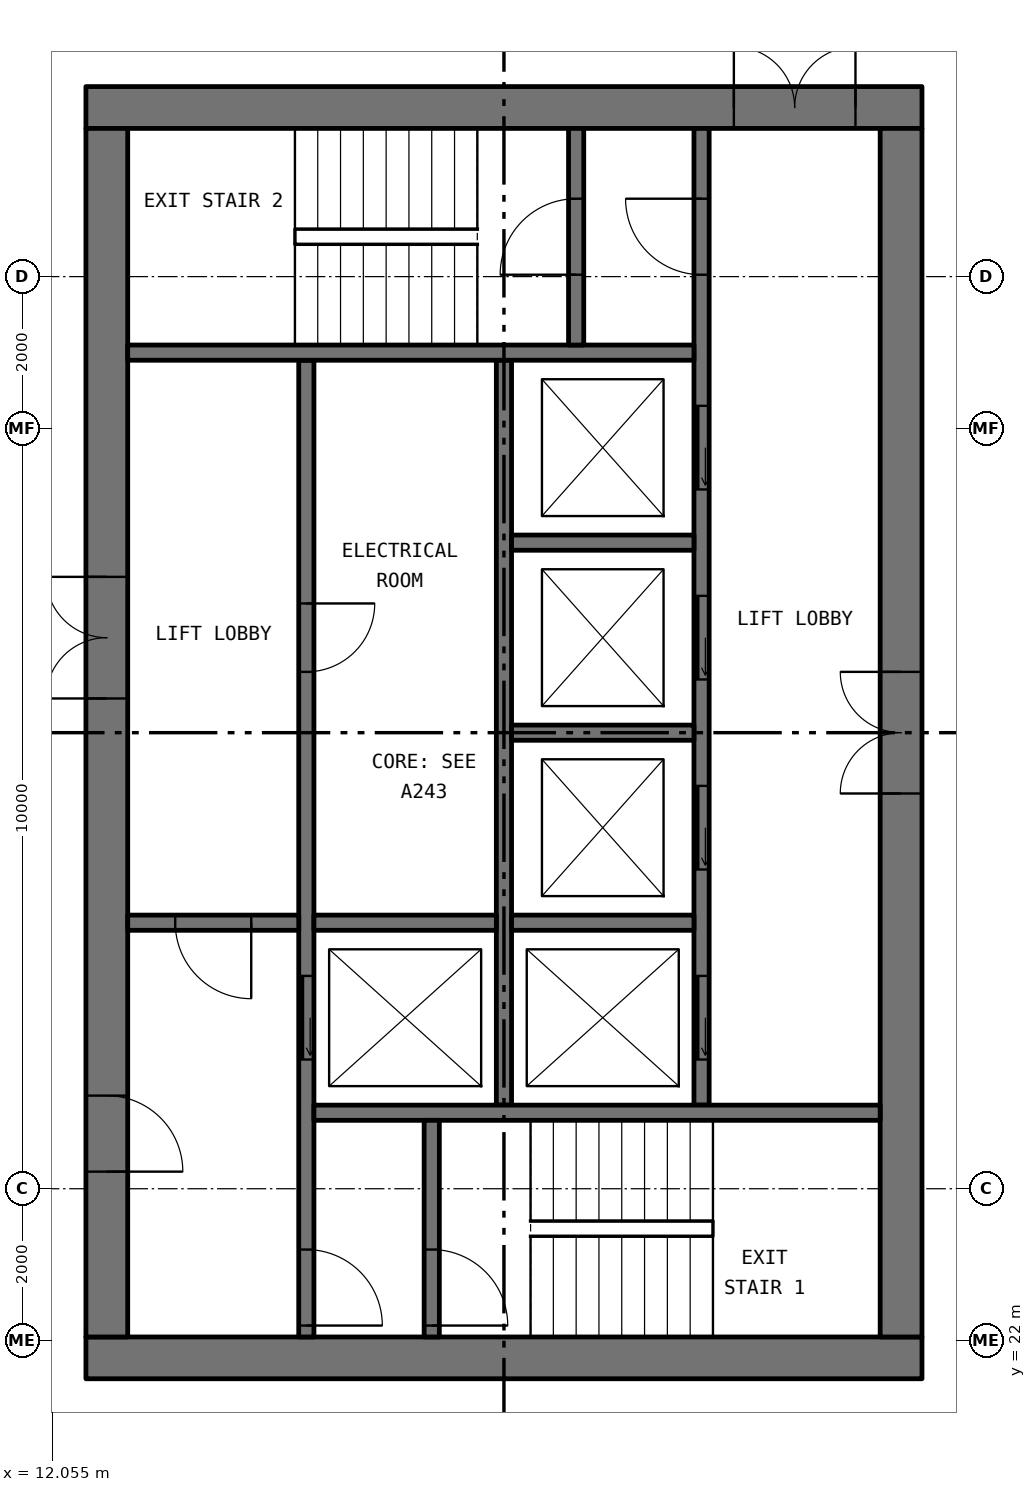
"""IFC4 building model, lengths in metres.
Left out: names, types, materials, properties, quantities, classifications, styles, units other than length and angle.
Written with IfcOpenShell. Run it as: python <this file> out.ifc"""

import sys

from ifc_helpers import new_model, si_unit, direction, frame, frame_2d, origin, place, context, subcontext, project, spatial, rectangle, extrude, element, fill, save


model = new_model("IFC4")
c1 = context("Model", 3, precision=1e-05, world=origin(), true_north=direction((0.0, 1.0)))
c2 = subcontext(c1, "Body", "Model", "MODEL_VIEW")
j1 = project(units=[si_unit("LENGTHUNIT", "METRE"), si_unit("PLANEANGLEUNIT", "RADIAN")], contexts=[c1])
p1 = place(None, origin())
s1 = spatial("IfcSite", under=j1, at=p1, CompositionType="ELEMENT")
p2 = place(p1, origin())
s2 = spatial("IfcBuilding", under=s1, at=p2, CompositionType="ELEMENT")
p3 = place(p2, frame((0.0, 0.0, 161.7)))
s3 = spatial("IfcBuildingStorey", under=s2, at=p3, CompositionType="ELEMENT", Elevation=161.7)
p4 = place(p3, frame((12.5, 21.775, 0.0), z_axis=(0.0, 0.0, 1.0), x_axis=(1.0, 0.0, 0.0)))
e1 = element("IfcWall", 1, at=p4, inside=s3, PredefinedType="SHEAR", context=c2, shape_type="SweptSolid", body=[
    extrude(rectangle(XDim=11.0, YDim=0.55, at=frame_2d((5.5, 0.0))), origin(), (0.0, 0.0, 1.0), 3.05),
])
p5 = place(p3, frame((12.5, 38.225, 0.0), z_axis=(0.0, 0.0, 1.0), x_axis=(1.0, 0.0, 0.0)))
e2 = element("IfcWall", 2, at=p5, inside=s3, PredefinedType="SHEAR", context=c2, shape_type="SweptSolid", body=[
    extrude(rectangle(XDim=11.0, YDim=0.55, at=frame_2d((5.5, 0.0))), origin(), (0.0, 0.0, 1.0), 3.05),
])
p6 = place(p5, frame((8.525, 0.0, 0.0)))
e3 = element("IfcOpeningElement", 3, at=p6, cuts=e2, PredefinedType="OPENING", context=c2, shape_type="SweptSolid", body=[
    extrude(rectangle(XDim=1.6, YDim=2.1, at=frame_2d((0.8, 1.05))), frame((0.0, 0.285, 0.0), z_axis=(0.0, -1.0, 0.0), x_axis=(1.0, 0.0, 0.0)), (0.0, 0.0, 1.0), 0.57),
])
p7 = place(p3, frame((12.775, 22.05, 0.0), z_axis=(0.0, 0.0, 1.0), x_axis=(0.0, 1.0, 0.0)))
e4 = element("IfcWall", 4, at=p7, inside=s3, PredefinedType="SHEAR", context=c2, shape_type="SweptSolid", body=[
    extrude(rectangle(XDim=15.9, YDim=0.55, at=frame_2d((7.95, 0.0))), origin(), (0.0, 0.0, 1.0), 3.05),
])
p8 = place(p7, frame((8.4, 0.0, 0.0)))
e5 = element("IfcOpeningElement", 5, at=p8, cuts=e4, PredefinedType="OPENING", context=c2, shape_type="SweptSolid", body=[
    extrude(rectangle(XDim=1.6, YDim=2.1, at=frame_2d((0.8, 1.05))), frame((0.0, 0.285, 0.0), z_axis=(0.0, -1.0, 0.0), x_axis=(1.0, 0.0, 0.0)), (0.0, 0.0, 1.0), 0.57),
])
p9 = place(p7, frame((2.175, 0.0, 0.0)))
e6 = element("IfcOpeningElement", 6, at=p9, cuts=e4, PredefinedType="OPENING", context=c2, shape_type="SweptSolid", body=[
    extrude(rectangle(XDim=1.0, YDim=2.1, at=frame_2d((0.5, 1.05))), frame((0.0, 0.285, 0.0), z_axis=(0.0, -1.0, 0.0), x_axis=(1.0, 0.0, 0.0)), (0.0, 0.0, 1.0), 0.57),
])
p10 = place(p3, frame((23.225, 22.05, 0.0), z_axis=(0.0, 0.0, 1.0), x_axis=(0.0, 1.0, 0.0)))
e7 = element("IfcWall", 7, at=p10, inside=s3, PredefinedType="SHEAR", context=c2, shape_type="SweptSolid", body=[
    extrude(rectangle(XDim=15.9, YDim=0.55, at=frame_2d((7.95, 0.0))), origin(), (0.0, 0.0, 1.0), 3.05),
])
p11 = place(p10, frame((7.15, 0.0, 0.0)))
e8 = element("IfcOpeningElement", 8, at=p11, cuts=e7, PredefinedType="OPENING", context=c2, shape_type="SweptSolid", body=[
    extrude(rectangle(XDim=1.6, YDim=2.1, at=frame_2d((0.8, 1.05))), frame((0.0, 0.285, 0.0), z_axis=(0.0, -1.0, 0.0), x_axis=(1.0, 0.0, 0.0)), (0.0, 0.0, 1.0), 0.57),
])
p12 = place(p3, frame((15.4, 22.05, 0.0), z_axis=(0.0, 0.0, 1.0), x_axis=(0.0, 1.0, 0.0)))
e9 = element("IfcWall", 9, at=p12, inside=s3, PredefinedType="SOLIDWALL", context=c2, shape_type="SweptSolid", body=[
    extrude(rectangle(XDim=12.85, YDim=0.2, at=frame_2d((6.425, 0.0))), origin(), (0.0, 0.0, 1.0), 3.05),
])
p13 = place(p12, frame((3.65, 0.0, 0.0)))
e10 = element("IfcOpeningElement", 10, at=p13, cuts=e9, PredefinedType="OPENING", context=c2, shape_type="SweptSolid", body=[
    extrude(rectangle(XDim=1.1, YDim=2.1, at=frame_2d((0.55, 1.05))), frame((0.0, 0.11, 0.0), z_axis=(0.0, -1.0, 0.0), x_axis=(1.0, 0.0, 0.0)), (0.0, 0.0, 1.0), 0.22),
])
p14 = place(p12, frame((0.15, 0.0, 0.0)))
e11 = element("IfcOpeningElement", 11, at=p14, cuts=e9, PredefinedType="OPENING", context=c2, shape_type="SweptSolid", body=[
    extrude(rectangle(XDim=1.0, YDim=2.1, at=frame_2d((0.5, 1.05))), frame((0.0, 0.11, 0.0), z_axis=(0.0, -1.0, 0.0), x_axis=(1.0, 0.0, 0.0)), (0.0, 0.0, 1.0), 0.22),
])
p15 = place(p12, frame((8.75, 0.0, 0.0)))
e12 = element("IfcOpeningElement", 12, at=p15, cuts=e9, PredefinedType="OPENING", context=c2, shape_type="SweptSolid", body=[
    extrude(rectangle(XDim=0.9, YDim=2.1, at=frame_2d((0.45, 1.05))), frame((0.0, 0.11, 0.0), z_axis=(0.0, -1.0, 0.0), x_axis=(1.0, 0.0, 0.0)), (0.0, 0.0, 1.0), 0.22),
])
p16 = place(p3, frame((20.6, 25.1, 0.0), z_axis=(0.0, 0.0, 1.0), x_axis=(0.0, 1.0, 0.0)))
e13 = element("IfcWall", 13, at=p16, inside=s3, PredefinedType="SOLIDWALL", context=c2, shape_type="SweptSolid", body=[
    extrude(rectangle(XDim=12.85, YDim=0.2, at=frame_2d((6.425, 0.0))), origin(), (0.0, 0.0, 1.0), 3.05),
])
p17 = place(p16, frame((0.6, 0.0, 0.0)))
e14 = element("IfcOpeningElement", 14, at=p17, cuts=e13, PredefinedType="OPENING", context=c2, shape_type="SweptSolid", body=[
    extrude(rectangle(XDim=1.1, YDim=2.1, at=frame_2d((0.55, 1.05))), frame((0.0, 0.11, 0.0), z_axis=(0.0, -1.0, 0.0), x_axis=(1.0, 0.0, 0.0)), (0.0, 0.0, 1.0), 0.22),
])
p18 = place(p16, frame((3.1, 0.0, 0.0)))
e15 = element("IfcOpeningElement", 15, at=p18, cuts=e13, PredefinedType="OPENING", context=c2, shape_type="SweptSolid", body=[
    extrude(rectangle(XDim=1.1, YDim=2.1, at=frame_2d((0.55, 1.05))), frame((0.0, 0.11, 0.0), z_axis=(0.0, -1.0, 0.0), x_axis=(1.0, 0.0, 0.0)), (0.0, 0.0, 1.0), 0.22),
])
p19 = place(p16, frame((5.6, 0.0, 0.0)))
e16 = element("IfcOpeningElement", 16, at=p19, cuts=e13, PredefinedType="OPENING", context=c2, shape_type="SweptSolid", body=[
    extrude(rectangle(XDim=1.1, YDim=2.1, at=frame_2d((0.55, 1.05))), frame((0.0, 0.11, 0.0), z_axis=(0.0, -1.0, 0.0), x_axis=(1.0, 0.0, 0.0)), (0.0, 0.0, 1.0), 0.22),
])
p20 = place(p16, frame((8.1, 0.0, 0.0)))
e17 = element("IfcOpeningElement", 17, at=p20, cuts=e13, PredefinedType="OPENING", context=c2, shape_type="SweptSolid", body=[
    extrude(rectangle(XDim=1.1, YDim=2.1, at=frame_2d((0.55, 1.05))), frame((0.0, 0.11, 0.0), z_axis=(0.0, -1.0, 0.0), x_axis=(1.0, 0.0, 0.0)), (0.0, 0.0, 1.0), 0.22),
])
p21 = place(p16, frame((10.925, 0.0, 0.0)))
e18 = element("IfcOpeningElement", 18, at=p21, cuts=e13, PredefinedType="OPENING", context=c2, shape_type="SweptSolid", body=[
    extrude(rectangle(XDim=1.0, YDim=2.1, at=frame_2d((0.5, 1.05))), frame((0.0, 0.11, 0.0), z_axis=(0.0, -1.0, 0.0), x_axis=(1.0, 0.0, 0.0)), (0.0, 0.0, 1.0), 0.22),
])
p22 = place(p3, frame((18.0, 25.1, 0.0), z_axis=(0.0, 0.0, 1.0), x_axis=(0.0, 1.0, 0.0)))
e19 = element("IfcWall", 19, at=p22, inside=s3, PredefinedType="SOLIDWALL", context=c2, shape_type="SweptSolid", body=[
    extrude(rectangle(XDim=9.8, YDim=0.2, at=frame_2d((4.9, 0.0))), origin(), (0.0, 0.0, 1.0), 3.05),
])
for number, where, z_axis, x_axis in (
    (20, (15.5, 25.0, 0.0), (0.0, 0.0, 1.0), (1.0, 0.0, 0.0)),
    (21, (13.05, 35.0, 0.0), (0.0, 0.0, 1.0), (1.0, 0.0, 0.0)),
):
    element("IfcWall", number, at=place(p3, frame(where, z_axis=z_axis, x_axis=x_axis)), inside=s3, PredefinedType="SOLIDWALL", context=c2, shape_type="SweptSolid", body=[
        extrude(rectangle(XDim=7.45, YDim=0.2, at=frame_2d((3.725, 0.0))), origin(), (0.0, 0.0, 1.0), 3.05),
    ])
p23 = place(p3, frame((13.05, 27.5, 0.0), z_axis=(0.0, 0.0, 1.0), x_axis=(1.0, 0.0, 0.0)))
e22 = element("IfcWall", 22, at=p23, inside=s3, PredefinedType="SOLIDWALL", context=c2, shape_type="SweptSolid", body=[
    extrude(rectangle(XDim=2.25, YDim=0.2, at=frame_2d((1.125, 0.0))), origin(), (0.0, 0.0, 1.0), 3.05),
])
p24 = place(p23, frame((0.625, 0.0, 0.0)))
e23 = element("IfcOpeningElement", 23, at=p24, cuts=e22, PredefinedType="OPENING", context=c2, shape_type="SweptSolid", body=[
    extrude(rectangle(XDim=1.0, YDim=2.1, at=frame_2d((0.5, 1.05))), frame((0.0, 0.11, 0.0), z_axis=(0.0, -1.0, 0.0), x_axis=(1.0, 0.0, 0.0)), (0.0, 0.0, 1.0), 0.22),
])
p25 = place(p3, frame((17.05, 22.05, 0.0), z_axis=(0.0, 0.0, 1.0), x_axis=(0.0, 1.0, 0.0)))
e24 = element("IfcWall", 24, at=p25, inside=s3, PredefinedType="SOLIDWALL", context=c2, shape_type="SweptSolid", body=[
    extrude(rectangle(XDim=2.85, YDim=0.2, at=frame_2d((1.425, 0.0))), origin(), (0.0, 0.0, 1.0), 3.05),
])
p26 = place(p25, frame((0.15, 0.0, 0.0)))
e25 = element("IfcOpeningElement", 25, at=p26, cuts=e24, PredefinedType="OPENING", context=c2, shape_type="SweptSolid", body=[
    extrude(rectangle(XDim=1.0, YDim=2.1, at=frame_2d((0.5, 1.05))), frame((0.0, 0.11, 0.0), z_axis=(0.0, -1.0, 0.0), x_axis=(1.0, 0.0, 0.0)), (0.0, 0.0, 1.0), 0.22),
])
p27 = place(p3, frame((18.95, 35.1, 0.0), z_axis=(0.0, 0.0, 1.0), x_axis=(0.0, 1.0, 0.0)))
e26 = element("IfcWall", 26, at=p27, inside=s3, PredefinedType="SOLIDWALL", context=c2, shape_type="SweptSolid", body=[
    extrude(rectangle(XDim=2.85, YDim=0.2, at=frame_2d((1.425, 0.0))), origin(), (0.0, 0.0, 1.0), 3.05),
])
p28 = place(p27, frame((0.925, 0.0, 0.0)))
e27 = element("IfcOpeningElement", 27, at=p28, cuts=e26, PredefinedType="OPENING", context=c2, shape_type="SweptSolid", body=[
    extrude(rectangle(XDim=1.0, YDim=2.1, at=frame_2d((0.5, 1.05))), frame((0.0, 0.11, 0.0), z_axis=(0.0, -1.0, 0.0), x_axis=(1.0, 0.0, 0.0)), (0.0, 0.0, 1.0), 0.22),
])
for number, where, z_axis, x_axis in (
    (28, (15.5, 27.5, 0.0), (0.0, 0.0, 1.0), (1.0, 0.0, 0.0)),
    (29, (18.1, 27.5, 0.0), (0.0, 0.0, 1.0), (1.0, 0.0, 0.0)),
    (30, (18.1, 30.0, 0.0), (0.0, 0.0, 1.0), (1.0, 0.0, 0.0)),
    (31, (18.1, 32.5, 0.0), (0.0, 0.0, 1.0), (1.0, 0.0, 0.0)),
):
    element("IfcWall", number, at=place(p3, frame(where, z_axis=z_axis, x_axis=x_axis)), inside=s3, PredefinedType="SOLIDWALL", context=c2, shape_type="SweptSolid", body=[
        extrude(rectangle(XDim=2.4, YDim=0.2, at=frame_2d((1.2, 0.0))), origin(), (0.0, 0.0, 1.0), 3.05),
    ])
p29 = place(p17, origin())
e32 = element("IfcDoor", 32, at=p29, inside=s3, OperationType="SLIDING_TO_LEFT", PredefinedType="DOOR", context=c2, shape_type="SweptSolid", body=[
    extrude(rectangle(XDim=1.1, YDim=2.1, at=frame_2d((0.55, 1.05))), frame((0.0, 0.025, 0.0), z_axis=(0.0, -1.0, 0.0), x_axis=(1.0, 0.0, 0.0)), (0.0, 0.0, 1.0), 0.05),
])
fill(e14, e32)
p30 = place(p18, origin())
e33 = element("IfcDoor", 33, at=p30, inside=s3, OperationType="SLIDING_TO_LEFT", PredefinedType="DOOR", context=c2, shape_type="SweptSolid", body=[
    extrude(rectangle(XDim=1.1, YDim=2.1, at=frame_2d((0.55, 1.05))), frame((0.0, 0.025, 0.0), z_axis=(0.0, -1.0, 0.0), x_axis=(1.0, 0.0, 0.0)), (0.0, 0.0, 1.0), 0.05),
])
fill(e15, e33)
p31 = place(p19, origin())
e34 = element("IfcDoor", 34, at=p31, inside=s3, OperationType="SLIDING_TO_LEFT", PredefinedType="DOOR", context=c2, shape_type="SweptSolid", body=[
    extrude(rectangle(XDim=1.1, YDim=2.1, at=frame_2d((0.55, 1.05))), frame((0.0, 0.025, 0.0), z_axis=(0.0, -1.0, 0.0), x_axis=(1.0, 0.0, 0.0)), (0.0, 0.0, 1.0), 0.05),
])
fill(e16, e34)
p32 = place(p20, origin())
e35 = element("IfcDoor", 35, at=p32, inside=s3, OperationType="SLIDING_TO_LEFT", PredefinedType="DOOR", context=c2, shape_type="SweptSolid", body=[
    extrude(rectangle(XDim=1.1, YDim=2.1, at=frame_2d((0.55, 1.05))), frame((0.0, 0.025, 0.0), z_axis=(0.0, -1.0, 0.0), x_axis=(1.0, 0.0, 0.0)), (0.0, 0.0, 1.0), 0.05),
])
fill(e17, e35)
p33 = place(p13, origin())
e36 = element("IfcDoor", 36, at=p33, inside=s3, OperationType="SLIDING_TO_LEFT", PredefinedType="DOOR", context=c2, shape_type="SweptSolid", body=[
    extrude(rectangle(XDim=1.1, YDim=2.1, at=frame_2d((0.55, 1.05))), frame((0.0, 0.025, 0.0), z_axis=(0.0, -1.0, 0.0), x_axis=(1.0, 0.0, 0.0)), (0.0, 0.0, 1.0), 0.05),
])
fill(e10, e36)
p34 = place(p26, frame((1.0, 0.0, 0.0), x_axis=(-1.0, 0.0, 0.0)))
e37 = element("IfcDoor", 37, at=p34, inside=s3, OperationType="SINGLE_SWING_LEFT", PredefinedType="DOOR", context=c2, shape_type="SweptSolid", body=[
    extrude(rectangle(XDim=1.0, YDim=2.1, at=frame_2d((0.5, 1.05))), frame((0.0, 0.025, 0.0), z_axis=(0.0, -1.0, 0.0), x_axis=(1.0, 0.0, 0.0)), (0.0, 0.0, 1.0), 0.05),
])
fill(e25, e37)
p35 = place(p14, frame((1.0, 0.0, 0.0), x_axis=(-1.0, 0.0, 0.0)))
e38 = element("IfcDoor", 38, at=p35, inside=s3, OperationType="SINGLE_SWING_LEFT", PredefinedType="DOOR", context=c2, shape_type="SweptSolid", body=[
    extrude(rectangle(XDim=1.0, YDim=2.1, at=frame_2d((0.5, 1.05))), frame((0.0, 0.025, 0.0), z_axis=(0.0, -1.0, 0.0), x_axis=(1.0, 0.0, 0.0)), (0.0, 0.0, 1.0), 0.05),
])
fill(e11, e38)
p36 = place(p21, origin())
e39 = element("IfcDoor", 39, at=p36, inside=s3, OperationType="SINGLE_SWING_LEFT", PredefinedType="DOOR", context=c2, shape_type="SweptSolid", body=[
    extrude(rectangle(XDim=1.0, YDim=2.1, at=frame_2d((0.5, 1.05))), frame((0.0, 0.025, 0.0), z_axis=(0.0, -1.0, 0.0), x_axis=(1.0, 0.0, 0.0)), (0.0, 0.0, 1.0), 0.05),
])
fill(e18, e39)
p37 = place(p28, origin())
e40 = element("IfcDoor", 40, at=p37, inside=s3, OperationType="SINGLE_SWING_RIGHT", PredefinedType="DOOR", context=c2, shape_type="SweptSolid", body=[
    extrude(rectangle(XDim=1.0, YDim=2.1, at=frame_2d((0.5, 1.05))), frame((0.0, 0.025, 0.0), z_axis=(0.0, -1.0, 0.0), x_axis=(1.0, 0.0, 0.0)), (0.0, 0.0, 1.0), 0.05),
])
fill(e27, e40)
p38 = place(p24, frame((1.0, 0.0, 0.0), x_axis=(-1.0, 0.0, 0.0)))
e41 = element("IfcDoor", 41, at=p38, inside=s3, OperationType="SINGLE_SWING_RIGHT", PredefinedType="DOOR", context=c2, shape_type="SweptSolid", body=[
    extrude(rectangle(XDim=1.0, YDim=2.1, at=frame_2d((0.5, 1.05))), frame((0.0, 0.025, 0.0), z_axis=(0.0, -1.0, 0.0), x_axis=(1.0, 0.0, 0.0)), (0.0, 0.0, 1.0), 0.05),
])
fill(e23, e41)
p39 = place(p8, origin())
e42 = element("IfcDoor", 42, at=p39, inside=s3, OperationType="DOUBLE_DOOR_SINGLE_SWING", PredefinedType="DOOR", context=c2, shape_type="SweptSolid", body=[
    extrude(rectangle(XDim=1.6, YDim=2.1, at=frame_2d((0.8, 1.05))), frame((0.0, 0.025, 0.0), z_axis=(0.0, -1.0, 0.0), x_axis=(1.0, 0.0, 0.0)), (0.0, 0.0, 1.0), 0.05),
])
fill(e5, e42)
p40 = place(p9, frame((1.0, 0.0, 0.0), x_axis=(-1.0, 0.0, 0.0)))
e43 = element("IfcDoor", 43, at=p40, inside=s3, OperationType="SINGLE_SWING_LEFT", PredefinedType="DOOR", context=c2, shape_type="SweptSolid", body=[
    extrude(rectangle(XDim=1.0, YDim=2.1, at=frame_2d((0.5, 1.05))), frame((0.0, 0.025, 0.0), z_axis=(0.0, -1.0, 0.0), x_axis=(1.0, 0.0, 0.0)), (0.0, 0.0, 1.0), 0.05),
])
fill(e6, e43)
p41 = place(p6, origin())
e44 = element("IfcDoor", 44, at=p41, inside=s3, OperationType="DOUBLE_DOOR_SINGLE_SWING", PredefinedType="DOOR", context=c2, shape_type="SweptSolid", body=[
    extrude(rectangle(XDim=1.6, YDim=2.1, at=frame_2d((0.8, 1.05))), frame((0.0, 0.025, 0.0), z_axis=(0.0, -1.0, 0.0), x_axis=(1.0, 0.0, 0.0)), (0.0, 0.0, 1.0), 0.05),
])
fill(e3, e44)
p42 = place(p11, origin())
e45 = element("IfcDoor", 45, at=p42, inside=s3, OperationType="DOUBLE_DOOR_SINGLE_SWING", PredefinedType="DOOR", context=c2, shape_type="SweptSolid", body=[
    extrude(rectangle(XDim=1.6, YDim=2.1, at=frame_2d((0.8, 1.05))), frame((0.0, 0.025, 0.0), z_axis=(0.0, -1.0, 0.0), x_axis=(1.0, 0.0, 0.0)), (0.0, 0.0, 1.0), 0.05),
])
fill(e8, e45)
p43 = place(p15, frame((0.9, 0.0, 0.0), x_axis=(-1.0, 0.0, 0.0)))
e46 = element("IfcDoor", 46, at=p43, inside=s3, OperationType="SINGLE_SWING_RIGHT", PredefinedType="DOOR", context=c2, shape_type="SweptSolid", body=[
    extrude(rectangle(XDim=0.9, YDim=2.1, at=frame_2d((0.45, 1.05))), frame((0.0, 0.025, 0.0), z_axis=(0.0, -1.0, 0.0), x_axis=(1.0, 0.0, 0.0)), (0.0, 0.0, 1.0), 0.05),
])
fill(e12, e46)
save(model, sys.argv[1])
